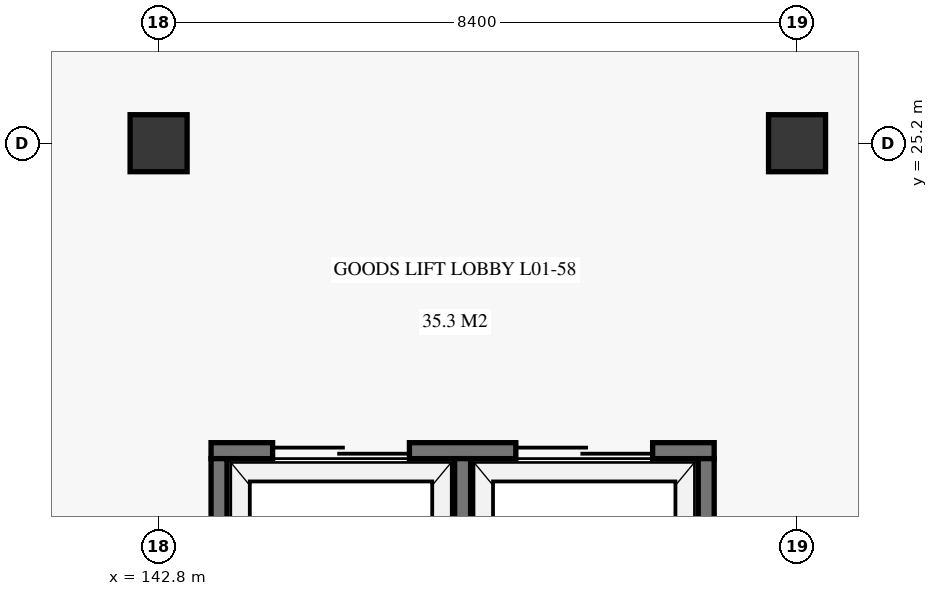
"""IFC4 building model, lengths in metres.
Left out: names, types, materials, properties, quantities, classifications, styles, units other than length and angle.
Written with IfcOpenShell. Run it as: python <this file> out.ifc"""

import sys

from ifc_helpers import new_model, si_unit, direction, frame, frame_2d, origin, origin_2d, place, context, subcontext, project, spatial, rectangle, extrude, element, fill, save


model = new_model("IFC4")
c1 = context("Model", 3, precision=1e-05, world=origin(), true_north=direction((0.0, 1.0)))
c2 = subcontext(c1, "Body", "Model", "MODEL_VIEW")
j1 = project(units=[si_unit("LENGTHUNIT", "METRE"), si_unit("PLANEANGLEUNIT", "RADIAN")], contexts=[c1])
p1 = place(None, origin())
s1 = spatial("IfcSite", under=j1, at=p1, CompositionType="ELEMENT")
p2 = place(p1, origin())
s2 = spatial("IfcBuilding", under=s1, at=p2, CompositionType="ELEMENT")
p3 = place(p2, origin())
s3 = spatial("IfcBuildingStorey", under=s2, at=p3, CompositionType="ELEMENT", Elevation=0.0)
for number, where, z_axis, x_axis in (
    (1, (142.8, 25.2, 0.0), (0.0, 0.0, 1.0), (1.0, 0.0, 0.0)),
    (2, (151.2, 25.2, 0.0), (0.0, 0.0, 1.0), (1.0, 0.0, 0.0)),
):
    element("IfcColumn", number, at=place(p3, frame(where, z_axis=z_axis, x_axis=x_axis)), inside=s3, PredefinedType="COLUMN", context=c2, shape_type="SweptSolid", body=[
        extrude(rectangle(XDim=0.75, YDim=0.75, at=origin_2d()), origin(), (0.0, 0.0, 1.0), 5.7),
    ])
p4 = place(p3, frame((143.49, 21.155, 0.0), z_axis=(0.0, 0.0, 1.0), x_axis=(1.0, 0.0, 0.0)))
e3 = element("IfcWall", 3, at=p4, inside=s3, PredefinedType="SHEAR", context=c2, shape_type="SweptSolid", body=[
    extrude(rectangle(XDim=6.62, YDim=0.21, at=frame_2d((3.31, 0.0))), origin(), (0.0, 0.0, 1.0), 5.7),
])
p5 = place(p4, frame((0.81, 0.0, 0.0)))
e4 = element("IfcOpeningElement", 4, at=p5, cuts=e3, PredefinedType="OPENING", context=c2, shape_type="SweptSolid", body=[
    extrude(rectangle(XDim=1.8, YDim=2.45, at=frame_2d((0.9, 1.225))), frame((0.0, 0.115, 0.0), z_axis=(0.0, -1.0, 0.0), x_axis=(1.0, 0.0, 0.0)), (0.0, 0.0, 1.0), 0.23),
])
p6 = place(p4, frame((4.01, 0.0, 0.0)))
e5 = element("IfcOpeningElement", 5, at=p6, cuts=e3, PredefinedType="OPENING", context=c2, shape_type="SweptSolid", body=[
    extrude(rectangle(XDim=1.8, YDim=2.45, at=frame_2d((0.9, 1.225))), frame((0.0, 0.115, 0.0), z_axis=(0.0, -1.0, 0.0), x_axis=(1.0, 0.0, 0.0)), (0.0, 0.0, 1.0), 0.23),
])
for number, where, z_axis, x_axis in (
    (6, (143.595, 17.45, 0.0), (0.0, 0.0, 1.0), (0.0, 1.0, 0.0)),
    (7, (150.005, 17.45, 0.0), (0.0, 0.0, 1.0), (0.0, 1.0, 0.0)),
    (8, (146.8, 17.45, 0.0), (0.0, 0.0, 1.0), (0.0, 1.0, 0.0)),
):
    element("IfcWall", number, at=place(p3, frame(where, z_axis=z_axis, x_axis=x_axis)), inside=s3, PredefinedType="SHEAR", context=c2, shape_type="SweptSolid", body=[
        extrude(rectangle(XDim=3.6, YDim=0.21, at=frame_2d((1.8, 0.0))), origin(), (0.0, 0.0, 1.0), 5.7),
    ])
p7 = place(p5, origin())
e9 = element("IfcDoor", 9, at=p7, inside=s3, OperationType="DOUBLE_DOOR_SLIDING", PredefinedType="DOOR", context=c2, shape_type="SweptSolid", body=[
    extrude(rectangle(XDim=1.8, YDim=2.45, at=frame_2d((0.9, 1.225))), frame((0.0, 0.025, 0.0), z_axis=(0.0, -1.0, 0.0), x_axis=(1.0, 0.0, 0.0)), (0.0, 0.0, 1.0), 0.05),
])
fill(e4, e9)
p8 = place(p6, origin())
e10 = element("IfcDoor", 10, at=p8, inside=s3, OperationType="DOUBLE_DOOR_SLIDING", PredefinedType="DOOR", context=c2, shape_type="SweptSolid", body=[
    extrude(rectangle(XDim=1.8, YDim=2.45, at=frame_2d((0.9, 1.225))), frame((0.0, 0.025, 0.0), z_axis=(0.0, -1.0, 0.0), x_axis=(1.0, 0.0, 0.0)), (0.0, 0.0, 1.0), 0.05),
])
fill(e5, e10)
save(model, sys.argv[1])
